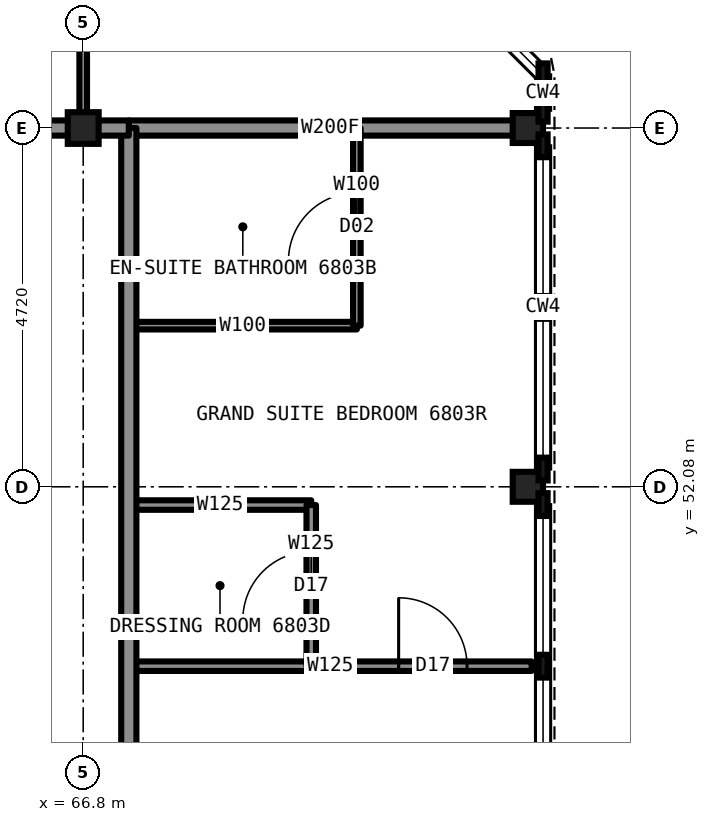
"""IFC4 building model, lengths in metres.
Left out: names, types, materials, properties, quantities, classifications, styles, units other than length and angle.
Written with IfcOpenShell. Run it as: python <this file> out.ifc"""

import sys

from ifc_helpers import new_model, si_unit, direction, frame, frame_2d, origin, origin_2d, place, context, subcontext, project, spatial, rectangle, i_section, extrude, element, fill, save


model = new_model("IFC4")
c1 = context("Model", 3, precision=1e-05, world=origin(), true_north=direction((0.0, 1.0)))
c2 = subcontext(c1, "Body", "Model", "MODEL_VIEW")
j1 = project(units=[si_unit("LENGTHUNIT", "METRE"), si_unit("PLANEANGLEUNIT", "RADIAN")], contexts=[c1])
p1 = place(None, origin())
s1 = spatial("IfcSite", under=j1, at=p1, CompositionType="ELEMENT")
p2 = place(p1, origin())
s2 = spatial("IfcBuilding", under=s1, at=p2, CompositionType="ELEMENT")
p3 = place(p2, frame((0.0, 0.0, 247.7)))
s3 = spatial("IfcBuildingStorey", under=s2, at=p3, CompositionType="ELEMENT", Elevation=247.7)
for number, where, z_axis, x_axis in (
    (1, (72.65, 52.08, 0.0), (0.0, 0.0, 1.0), (1.0, 0.0, 0.0)),
    (2, (72.65, 56.8, 0.0), (0.0, 0.0, 1.0), (1.0, 0.0, 0.0)),
):
    element("IfcColumn", number, at=place(p3, frame(where, z_axis=z_axis, x_axis=x_axis)), inside=s3, PredefinedType="COLUMN", context=c2, shape_type="SweptSolid", body=[
        extrude(i_section(OverallWidth=0.399, OverallDepth=0.394, WebThickness=0.023, FlangeThickness=0.037, at=origin_2d()), origin(), (0.0, 0.0, 1.0), 3.5),
    ])
p4 = place(p3, frame((66.8, 56.8, 0.0), z_axis=(0.0, 0.0, 1.0), x_axis=(1.0, 0.0, 0.0)))
e3 = element("IfcColumn", 3, at=p4, inside=s3, PredefinedType="COLUMN", context=c2, shape_type="SweptSolid", body=[
    extrude(i_section(OverallWidth=0.406, OverallDepth=0.417, WebThickness=0.03, FlangeThickness=0.048, at=origin_2d()), origin(), (0.0, 0.0, 1.0), 3.5),
])
p5 = place(p3, frame((65.0, 56.8, 0.0), z_axis=(0.0, 0.0, 1.0), x_axis=(1.0, 0.0, 0.0)))
e4 = element("IfcWall", 4, at=p5, inside=s3, PredefinedType="PARTITIONING", context=c2, shape_type="SweptSolid", body=[
    extrude(rectangle(XDim=1.78, YDim=0.2, at=frame_2d((0.89, 0.0))), origin(), (0.0, 0.0, 1.0), 3.33),
])
p6 = place(p3, frame((67.4, 56.8, 0.0), z_axis=(0.0, 0.0, 1.0), x_axis=(1.0, 0.0, 0.0)))
e5 = element("IfcWall", 5, at=p6, inside=s3, PredefinedType="PARTITIONING", context=c2, shape_type="SweptSolid", body=[
    extrude(rectangle(XDim=5.3, YDim=0.2, at=frame_2d((2.65, 0.0))), origin(), (0.0, 0.0, 1.0), 2.573),
])
p7 = place(p3, frame((67.4, 49.72, 0.0), z_axis=(0.0, 0.0, 1.0), x_axis=(1.0, 0.0, 0.0)))
e6 = element("IfcWall", 6, at=p7, inside=s3, PredefinedType="PARTITIONING", context=c2, shape_type="SweptSolid", body=[
    extrude(rectangle(XDim=5.3, YDim=0.125, at=frame_2d((2.65, 0.0))), origin(), (0.0, 0.0, 1.0), 2.797),
])
p8 = place(p7, frame((3.55, 0.0, 0.0)))
e7 = element("IfcOpeningElement", 7, at=p8, cuts=e6, PredefinedType="OPENING", context=c2, shape_type="SweptSolid", body=[
    extrude(rectangle(XDim=0.9, YDim=2.2, at=frame_2d((0.45, 1.1))), frame((0.0, 0.073, 0.0), z_axis=(0.0, -1.0, 0.0), x_axis=(1.0, 0.0, 0.0)), (0.0, 0.0, 1.0), 0.145),
])
p9 = place(p3, frame((67.4, 51.84, 0.0), z_axis=(0.0, 0.0, 1.0), x_axis=(1.0, 0.0, 0.0)))
e8 = element("IfcWall", 8, at=p9, inside=s3, PredefinedType="PARTITIONING", context=c2, shape_type="SweptSolid", body=[
    extrude(rectangle(XDim=2.4, YDim=0.125, at=frame_2d((1.2, 0.0))), origin(), (0.0, 0.0, 1.0), 3.33),
])
p10 = place(p3, frame((67.4, 54.2, 0.0), z_axis=(0.0, 0.0, 1.0), x_axis=(1.0, 0.0, 0.0)))
e9 = element("IfcWall", 9, at=p10, inside=s3, PredefinedType="PARTITIONING", context=c2, shape_type="SweptSolid", body=[
    extrude(rectangle(XDim=3.0, YDim=0.1, at=frame_2d((1.5, 0.0))), origin(), (0.0, 0.0, 1.0), 3.33),
])
p11 = place(p3, frame((66.8, 56.8, 0.0), z_axis=(0.0, 0.0, 1.0), x_axis=(0.0, 1.0, 0.0)))
e10 = element("IfcWall", 10, at=p11, inside=s3, PredefinedType="PARTITIONING", context=c2, shape_type="SweptSolid", body=[
    extrude(rectangle(XDim=2.8, YDim=0.1, at=frame_2d((1.4, 0.0))), origin(), (0.0, 0.0, 1.0), 2.573),
])
p12 = place(p3, frame((67.4, 33.2, 0.0), z_axis=(0.0, 0.0, 1.0), x_axis=(0.0, 1.0, 0.0)))
e11 = element("IfcWall", 11, at=p12, inside=s3, PredefinedType="PARTITIONING", context=c2, shape_type="SweptSolid", body=[
    extrude(rectangle(XDim=23.6, YDim=0.2, at=frame_2d((11.8, 0.0))), origin(), (0.0, 0.0, 1.0), 3.33),
])
p13 = place(p12, frame((8.95, 0.0, 0.0)))
e12 = element("IfcOpeningElement", 12, at=p13, cuts=e11, PredefinedType="OPENING", context=c2, shape_type="SweptSolid", body=[
    extrude(rectangle(XDim=1.1, YDim=2.2, at=frame_2d((0.55, 1.1))), frame((0.0, 0.11, 0.0), z_axis=(0.0, -1.0, 0.0), x_axis=(1.0, 0.0, 0.0)), (0.0, 0.0, 1.0), 0.22),
])
p14 = place(p12, frame((0.7, 0.0, 0.0)))
e13 = element("IfcOpeningElement", 13, at=p14, cuts=e11, PredefinedType="OPENING", context=c2, shape_type="SweptSolid", body=[
    extrude(rectangle(XDim=1.0, YDim=2.1, at=frame_2d((0.5, 1.05))), frame((0.0, 0.11, 0.0), z_axis=(0.0, -1.0, 0.0), x_axis=(1.0, 0.0, 0.0)), (0.0, 0.0, 1.0), 0.22),
])
p15 = place(p3, frame((69.8, 49.72, 0.0), z_axis=(0.0, 0.0, 1.0), x_axis=(0.0, 1.0, 0.0)))
e14 = element("IfcWall", 14, at=p15, inside=s3, PredefinedType="PARTITIONING", context=c2, shape_type="SweptSolid", body=[
    extrude(rectangle(XDim=2.12, YDim=0.125, at=frame_2d((1.06, 0.0))), origin(), (0.0, 0.0, 1.0), 3.33),
])
p16 = place(p15, frame((0.61, 0.0, 0.0)))
e15 = element("IfcOpeningElement", 15, at=p16, cuts=e14, PredefinedType="OPENING", context=c2, shape_type="SweptSolid", body=[
    extrude(rectangle(XDim=0.9, YDim=2.2, at=frame_2d((0.45, 1.1))), frame((0.0, 0.073, 0.0), z_axis=(0.0, -1.0, 0.0), x_axis=(1.0, 0.0, 0.0)), (0.0, 0.0, 1.0), 0.145),
])
p17 = place(p3, frame((70.4, 54.2, 0.0), z_axis=(0.0, 0.0, 1.0), x_axis=(0.0, 1.0, 0.0)))
e16 = element("IfcWall", 16, at=p17, inside=s3, PredefinedType="PARTITIONING", context=c2, shape_type="SweptSolid", body=[
    extrude(rectangle(XDim=2.6, YDim=0.1, at=frame_2d((1.3, 0.0))), origin(), (0.0, 0.0, 1.0), 3.33),
])
p18 = place(p17, frame((0.85, 0.0, 0.0)))
e17 = element("IfcOpeningElement", 17, at=p18, cuts=e16, PredefinedType="OPENING", context=c2, shape_type="SweptSolid", body=[
    extrude(rectangle(XDim=0.9, YDim=2.1, at=frame_2d((0.45, 1.05))), frame((0.0, 0.06, 0.0), z_axis=(0.0, -1.0, 0.0), x_axis=(1.0, 0.0, 0.0)), (0.0, 0.0, 1.0), 0.12),
])
p19 = place(p3, frame((66.78, 56.8, 0.0), z_axis=(0.0, 0.0, 1.0), x_axis=(1.0, 0.0, 0.0)))
e18 = element("IfcWall", 18, at=p19, inside=s3, PredefinedType="PARTITIONING", context=c2, shape_type="SweptSolid", body=[
    extrude(rectangle(XDim=0.62, YDim=0.2, at=frame_2d((0.31, 0.0))), origin(), (0.0, 0.0, 1.0), 2.573),
])
p20 = place(p18, origin())
e19 = element("IfcDoor", 19, at=p20, inside=s3, OperationType="SINGLE_SWING_RIGHT", PredefinedType="DOOR", context=c2, shape_type="SweptSolid", body=[
    extrude(rectangle(XDim=0.9, YDim=2.1, at=frame_2d((0.45, 1.05))), frame((0.0, 0.025, 0.0), z_axis=(0.0, -1.0, 0.0), x_axis=(1.0, 0.0, 0.0)), (0.0, 0.0, 1.0), 0.05),
])
fill(e17, e19)
p21 = place(p16, origin())
e20 = element("IfcDoor", 20, at=p21, inside=s3, OperationType="SINGLE_SWING_LEFT", PredefinedType="DOOR", context=c2, shape_type="SweptSolid", body=[
    extrude(rectangle(XDim=0.9, YDim=2.2, at=frame_2d((0.45, 1.1))), frame((0.0, 0.025, 0.0), z_axis=(0.0, -1.0, 0.0), x_axis=(1.0, 0.0, 0.0)), (0.0, 0.0, 1.0), 0.05),
])
fill(e15, e20)
p22 = place(p8, origin())
e21 = element("IfcDoor", 21, at=p22, inside=s3, OperationType="SINGLE_SWING_LEFT", PredefinedType="DOOR", context=c2, shape_type="SweptSolid", body=[
    extrude(rectangle(XDim=0.9, YDim=2.2, at=frame_2d((0.45, 1.1))), frame((0.0, 0.025, 0.0), z_axis=(0.0, -1.0, 0.0), x_axis=(1.0, 0.0, 0.0)), (0.0, 0.0, 1.0), 0.05),
])
fill(e7, e21)
save(model, sys.argv[1])
